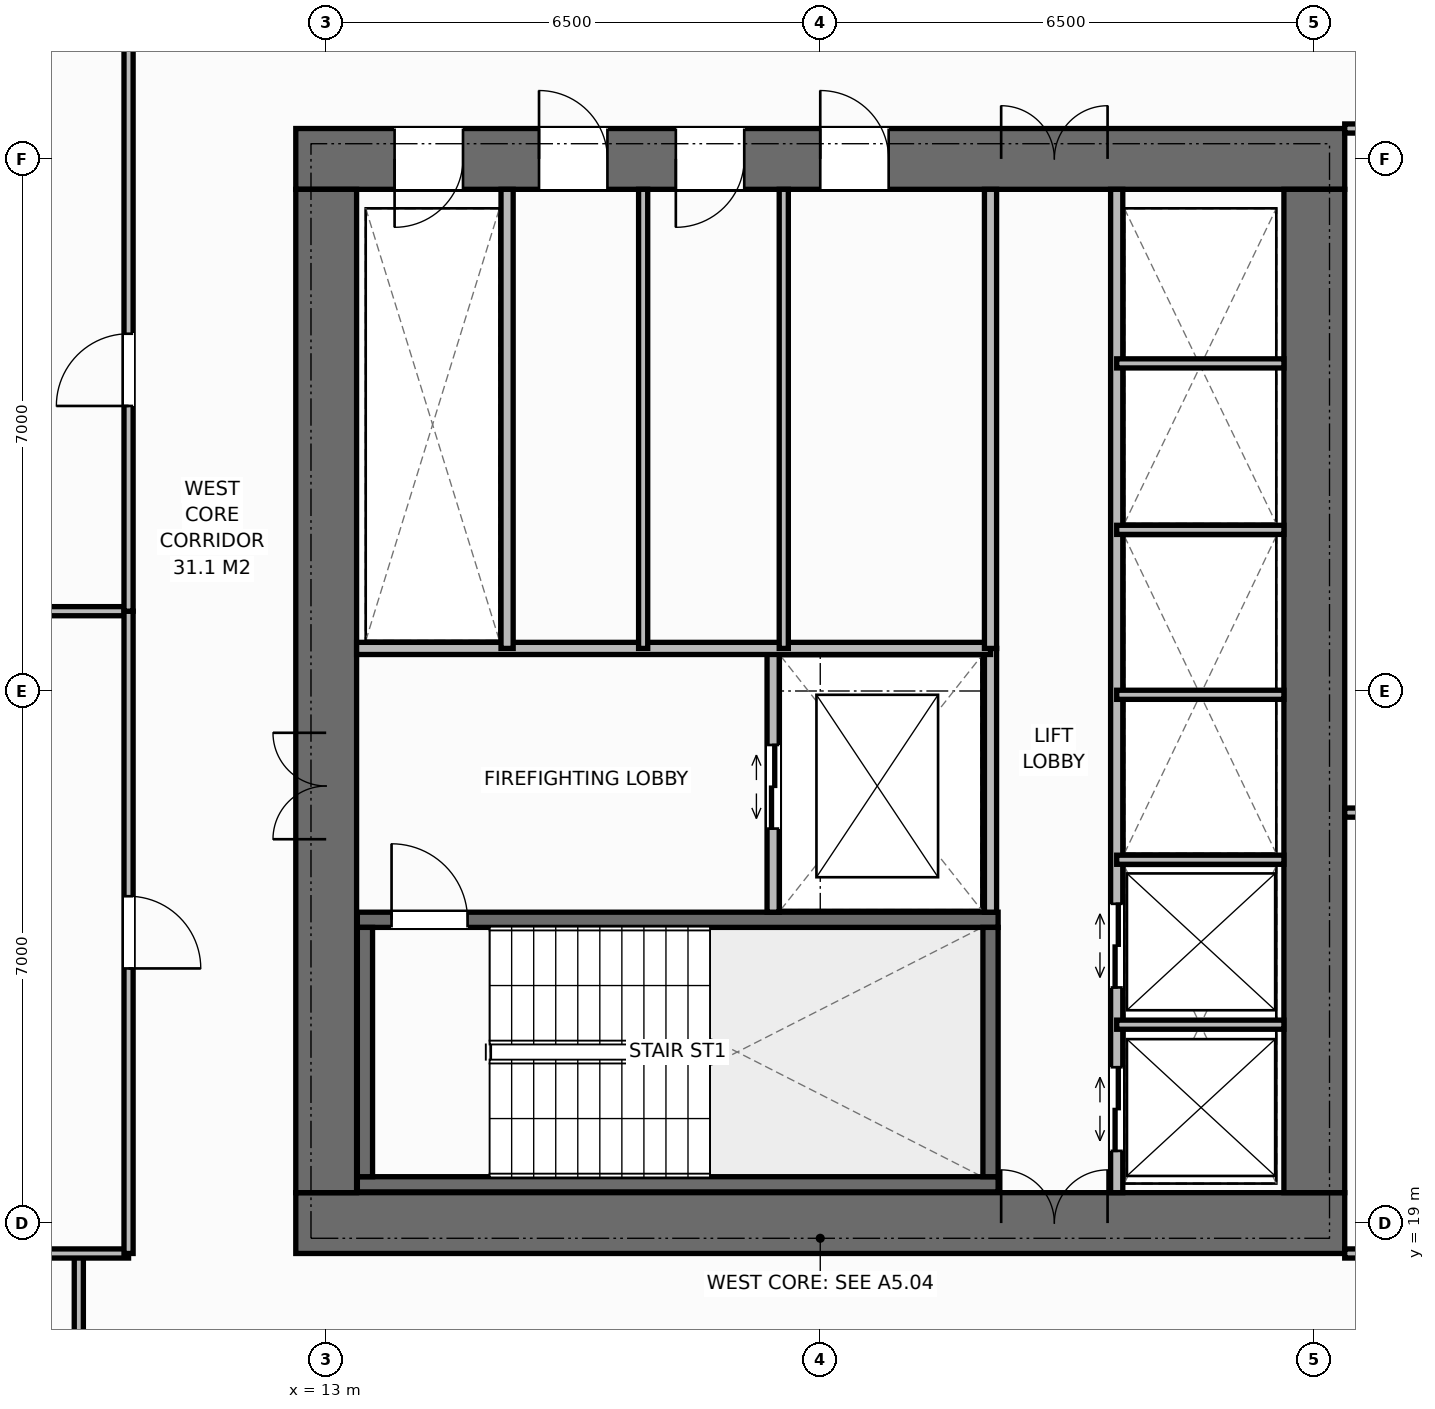
"""IFC4 building model, lengths in metres.
Left out: names, types, materials, properties, quantities, classifications, styles, units other than length and angle.
Written with IfcOpenShell. Run it as: python <this file> out.ifc"""

import sys

from ifc_helpers import new_model, si_unit, direction, frame, frame_2d, origin, place, context, subcontext, project, spatial, rectangle, extrude, element, fill, save


model = new_model("IFC4")
c1 = context("Model", 3, precision=1e-05, world=origin(), true_north=direction((0.0, 1.0)))
c2 = subcontext(c1, "Body", "Model", "MODEL_VIEW")
j1 = project(units=[si_unit("LENGTHUNIT", "METRE"), si_unit("PLANEANGLEUNIT", "RADIAN")], contexts=[c1])
p1 = place(None, origin())
s1 = spatial("IfcSite", under=j1, at=p1, CompositionType="ELEMENT")
p2 = place(p1, origin())
s2 = spatial("IfcBuilding", under=s1, at=p2, CompositionType="ELEMENT")
p3 = place(p2, frame((0.0, 0.0, 77.2)))
s3 = spatial("IfcBuildingStorey", under=s2, at=p3, CompositionType="ELEMENT", Elevation=77.2)
p4 = place(p3, frame((12.6, 19.0, 0.0), z_axis=(0.0, 0.0, 1.0), x_axis=(1.0, 0.0, 0.0)))
e1 = element("IfcWall", 1, at=p4, inside=s3, PredefinedType="SHEAR", context=c2, shape_type="SweptSolid", body=[
    extrude(rectangle(XDim=13.8, YDim=0.8, at=frame_2d((6.9, 0.0))), origin(), (0.0, 0.0, 1.0), 3.8),
])
p5 = place(p4, frame((9.28, 0.0, 0.0)))
e2 = element("IfcOpeningElement", 2, at=p5, cuts=e1, PredefinedType="OPENING", context=c2, shape_type="SweptSolid", body=[
    extrude(rectangle(XDim=1.4, YDim=2.2, at=frame_2d((0.7, 1.1))), frame((0.0, 0.41, 0.0), z_axis=(0.0, -1.0, 0.0), x_axis=(1.0, 0.0, 0.0)), (0.0, 0.0, 1.0), 0.82),
])
p6 = place(p3, frame((12.6, 33.0, 0.0), z_axis=(0.0, 0.0, 1.0), x_axis=(1.0, 0.0, 0.0)))
e3 = element("IfcWall", 3, at=p6, inside=s3, PredefinedType="SHEAR", context=c2, shape_type="SweptSolid", body=[
    extrude(rectangle(XDim=13.8, YDim=0.8, at=frame_2d((6.9, 0.0))), origin(), (0.0, 0.0, 1.0), 3.8),
])
p7 = place(p6, frame((1.3, 0.0, 0.0)))
e4 = element("IfcOpeningElement", 4, at=p7, cuts=e3, PredefinedType="OPENING", context=c2, shape_type="SweptSolid", body=[
    extrude(rectangle(XDim=0.9, YDim=2.15, at=frame_2d((0.45, 1.075))), frame((0.0, 0.41, 0.0), z_axis=(0.0, -1.0, 0.0), x_axis=(1.0, 0.0, 0.0)), (0.0, 0.0, 1.0), 0.82),
])
p8 = place(p6, frame((3.2, 0.0, 0.0)))
e5 = element("IfcOpeningElement", 5, at=p8, cuts=e3, PredefinedType="OPENING", context=c2, shape_type="SweptSolid", body=[
    extrude(rectangle(XDim=0.9, YDim=2.15, at=frame_2d((0.45, 1.075))), frame((0.0, 0.41, 0.0), z_axis=(0.0, -1.0, 0.0), x_axis=(1.0, 0.0, 0.0)), (0.0, 0.0, 1.0), 0.82),
])
p9 = place(p6, frame((5.0, 0.0, 0.0)))
e6 = element("IfcOpeningElement", 6, at=p9, cuts=e3, PredefinedType="OPENING", context=c2, shape_type="SweptSolid", body=[
    extrude(rectangle(XDim=0.9, YDim=2.15, at=frame_2d((0.45, 1.075))), frame((0.0, 0.41, 0.0), z_axis=(0.0, -1.0, 0.0), x_axis=(1.0, 0.0, 0.0)), (0.0, 0.0, 1.0), 0.82),
])
p10 = place(p6, frame((6.9, 0.0, 0.0)))
e7 = element("IfcOpeningElement", 7, at=p10, cuts=e3, PredefinedType="OPENING", context=c2, shape_type="SweptSolid", body=[
    extrude(rectangle(XDim=0.9, YDim=2.15, at=frame_2d((0.45, 1.075))), frame((0.0, 0.41, 0.0), z_axis=(0.0, -1.0, 0.0), x_axis=(1.0, 0.0, 0.0)), (0.0, 0.0, 1.0), 0.82),
])
p11 = place(p6, frame((9.28, 0.0, 0.0)))
e8 = element("IfcOpeningElement", 8, at=p11, cuts=e3, PredefinedType="OPENING", context=c2, shape_type="SweptSolid", body=[
    extrude(rectangle(XDim=1.4, YDim=2.2, at=frame_2d((0.7, 1.1))), frame((0.0, 0.41, 0.0), z_axis=(0.0, -1.0, 0.0), x_axis=(1.0, 0.0, 0.0)), (0.0, 0.0, 1.0), 0.82),
])
p12 = place(p3, frame((13.0, 19.4, 0.0), z_axis=(0.0, 0.0, 1.0), x_axis=(0.0, 1.0, 0.0)))
e9 = element("IfcWall", 9, at=p12, inside=s3, PredefinedType="SHEAR", context=c2, shape_type="SweptSolid", body=[
    extrude(rectangle(XDim=13.2, YDim=0.8, at=frame_2d((6.6, 0.0))), origin(), (0.0, 0.0, 1.0), 3.8),
])
p13 = place(p12, frame((4.65, 0.0, 0.0)))
e10 = element("IfcOpeningElement", 10, at=p13, cuts=e9, PredefinedType="OPENING", context=c2, shape_type="SweptSolid", body=[
    extrude(rectangle(XDim=1.4, YDim=2.2, at=frame_2d((0.7, 1.1))), frame((0.0, 0.41, 0.0), z_axis=(0.0, -1.0, 0.0), x_axis=(1.0, 0.0, 0.0)), (0.0, 0.0, 1.0), 0.82),
])
p14 = place(p3, frame((26.0, 19.4, 0.0), z_axis=(0.0, 0.0, 1.0), x_axis=(0.0, 1.0, 0.0)))
e11 = element("IfcWall", 11, at=p14, inside=s3, PredefinedType="SHEAR", context=c2, shape_type="SweptSolid", body=[
    extrude(rectangle(XDim=13.2, YDim=0.8, at=frame_2d((6.6, 0.0))), origin(), (0.0, 0.0, 1.0), 3.8),
])
p15 = place(p3, frame((13.41, 19.51, 0.0), z_axis=(0.0, 0.0, 1.0), x_axis=(1.0, 0.0, 0.0)))
e12 = element("IfcWall", 12, at=p15, inside=s3, PredefinedType="SHEAR", context=c2, shape_type="SweptSolid", body=[
    extrude(rectangle(XDim=8.43, YDim=0.2, at=frame_2d((4.215, 0.0))), origin(), (0.0, 0.0, 1.0), 3.8),
])
p16 = place(p3, frame((13.41, 22.99, 0.0), z_axis=(0.0, 0.0, 1.0), x_axis=(1.0, 0.0, 0.0)))
e13 = element("IfcWall", 13, at=p16, inside=s3, PredefinedType="SHEAR", context=c2, shape_type="SweptSolid", body=[
    extrude(rectangle(XDim=8.43, YDim=0.2, at=frame_2d((4.215, 0.0))), origin(), (0.0, 0.0, 1.0), 3.8),
])
p17 = place(p16, frame((0.45, 0.0, 0.0)))
e14 = element("IfcOpeningElement", 14, at=p17, cuts=e13, PredefinedType="OPENING", context=c2, shape_type="SweptSolid", body=[
    extrude(rectangle(XDim=1.0, YDim=2.15, at=frame_2d((0.5, 1.075))), frame((0.0, 0.11, 0.0), z_axis=(0.0, -1.0, 0.0), x_axis=(1.0, 0.0, 0.0)), (0.0, 0.0, 1.0), 0.22),
])
for number, where, z_axis, x_axis in (
    (15, (13.51, 19.61, 0.0), (0.0, 0.0, 1.0), (0.0, 1.0, 0.0)),
    (16, (21.74, 19.61, 0.0), (0.0, 0.0, 1.0), (0.0, 1.0, 0.0)),
):
    element("IfcWall", number, at=place(p3, frame(where, z_axis=z_axis, x_axis=x_axis)), inside=s3, PredefinedType="SHEAR", context=c2, shape_type="SweptSolid", body=[
        extrude(rectangle(XDim=3.28, YDim=0.2, at=frame_2d((1.64, 0.0))), origin(), (0.0, 0.0, 1.0), 3.8),
    ])
p18 = place(p3, frame((21.74, 23.09, 0.0), z_axis=(0.0, 0.0, 1.0), x_axis=(0.0, 1.0, 0.0)))
e17 = element("IfcWall", 17, at=p18, inside=s3, PredefinedType="STANDARD", context=c2, shape_type="SweptSolid", body=[
    extrude(rectangle(XDim=3.47, YDim=0.16, at=frame_2d((1.735, 0.0))), origin(), (0.0, 0.0, 1.0), 3.52),
])
p19 = place(p3, frame((18.88, 23.09, 0.0), z_axis=(0.0, 0.0, 1.0), x_axis=(0.0, 1.0, 0.0)))
e18 = element("IfcWall", 18, at=p19, inside=s3, PredefinedType="STANDARD", context=c2, shape_type="SweptSolid", body=[
    extrude(rectangle(XDim=3.47, YDim=0.16, at=frame_2d((1.735, 0.0))), origin(), (0.0, 0.0, 1.0), 3.52),
])
p20 = place(p19, frame((1.1, 0.0, 0.0)))
e19 = element("IfcOpeningElement", 19, at=p20, cuts=e18, PredefinedType="OPENING", context=c2, shape_type="SweptSolid", body=[
    extrude(rectangle(XDim=1.1, YDim=2.2, at=frame_2d((0.55, 1.1))), frame((0.0, 0.09, 0.0), z_axis=(0.0, -1.0, 0.0), x_axis=(1.0, 0.0, 0.0)), (0.0, 0.0, 1.0), 0.18),
])
p21 = place(p3, frame((13.4, 26.56, 0.0), z_axis=(0.0, 0.0, 1.0), x_axis=(1.0, 0.0, 0.0)))
e20 = element("IfcWall", 20, at=p21, inside=s3, PredefinedType="STANDARD", context=c2, shape_type="SweptSolid", body=[
    extrude(rectangle(XDim=8.34, YDim=0.16, at=frame_2d((4.17, 0.0))), origin(), (0.0, 0.0, 1.0), 3.52),
])
p22 = place(p3, frame((15.38, 26.56, 0.0), z_axis=(0.0, 0.0, 1.0), x_axis=(0.0, 1.0, 0.0)))
e21 = element("IfcWall", 21, at=p22, inside=s3, PredefinedType="STANDARD", context=c2, shape_type="SweptSolid", body=[
    extrude(rectangle(XDim=6.04, YDim=0.16, at=frame_2d((3.02, 0.0))), origin(), (0.0, 0.0, 1.0), 3.52),
])
for number, where, z_axis, x_axis in (
    (22, (17.17, 26.56, 0.0), (0.0, 0.0, 1.0), (0.0, 1.0, 0.0)),
    (23, (19.02, 26.56, 0.0), (0.0, 0.0, 1.0), (0.0, 1.0, 0.0)),
):
    element("IfcWall", number, at=place(p3, frame(where, z_axis=z_axis, x_axis=x_axis)), inside=s3, PredefinedType="PARTITIONING", context=c2, shape_type="SweptSolid", body=[
        extrude(rectangle(XDim=6.04, YDim=0.12, at=frame_2d((3.02, 0.0))), origin(), (0.0, 0.0, 1.0), 3.52),
    ])
p23 = place(p3, frame((21.74, 26.56, 0.0), z_axis=(0.0, 0.0, 1.0), x_axis=(0.0, 1.0, 0.0)))
e24 = element("IfcWall", 24, at=p23, inside=s3, PredefinedType="STANDARD", context=c2, shape_type="SweptSolid", body=[
    extrude(rectangle(XDim=6.04, YDim=0.16, at=frame_2d((3.02, 0.0))), origin(), (0.0, 0.0, 1.0), 3.52),
])
p24 = place(p3, frame((23.4, 19.4, 0.0), z_axis=(0.0, 0.0, 1.0), x_axis=(0.0, 1.0, 0.0)))
e25 = element("IfcWall", 25, at=p24, inside=s3, PredefinedType="STANDARD", context=c2, shape_type="SweptSolid", body=[
    extrude(rectangle(XDim=13.2, YDim=0.16, at=frame_2d((6.6, 0.0))), origin(), (0.0, 0.0, 1.0), 3.52),
])
p25 = place(p24, frame((0.55, 0.0, 0.0)))
e26 = element("IfcOpeningElement", 26, at=p25, cuts=e25, PredefinedType="OPENING", context=c2, shape_type="SweptSolid", body=[
    extrude(rectangle(XDim=1.1, YDim=2.2, at=frame_2d((0.55, 1.1))), frame((0.0, 0.09, 0.0), z_axis=(0.0, -1.0, 0.0), x_axis=(1.0, 0.0, 0.0)), (0.0, 0.0, 1.0), 0.18),
])
p26 = place(p24, frame((2.7, 0.0, 0.0)))
e27 = element("IfcOpeningElement", 27, at=p26, cuts=e25, PredefinedType="OPENING", context=c2, shape_type="SweptSolid", body=[
    extrude(rectangle(XDim=1.1, YDim=2.2, at=frame_2d((0.55, 1.1))), frame((0.0, 0.09, 0.0), z_axis=(0.0, -1.0, 0.0), x_axis=(1.0, 0.0, 0.0)), (0.0, 0.0, 1.0), 0.18),
])
for number, where, z_axis, x_axis in (
    (28, (23.4, 21.61, 0.0), (0.0, 0.0, 1.0), (1.0, 0.0, 0.0)),
    (29, (23.4, 23.78, 0.0), (0.0, 0.0, 1.0), (1.0, 0.0, 0.0)),
    (30, (23.4, 25.95, 0.0), (0.0, 0.0, 1.0), (1.0, 0.0, 0.0)),
    (31, (23.4, 28.12, 0.0), (0.0, 0.0, 1.0), (1.0, 0.0, 0.0)),
    (32, (23.4, 30.31, 0.0), (0.0, 0.0, 1.0), (1.0, 0.0, 0.0)),
):
    element("IfcWall", number, at=place(p3, frame(where, z_axis=z_axis, x_axis=x_axis)), inside=s3, PredefinedType="PARTITIONING", context=c2, shape_type="SweptSolid", body=[
        extrude(rectangle(XDim=2.2, YDim=0.12, at=frame_2d((1.1, 0.0))), origin(), (0.0, 0.0, 1.0), 3.52),
    ])
p27 = place(p3, frame((26.4, 24.4, 0.0), z_axis=(0.0, 0.0, 1.0), x_axis=(1.0, 0.0, 0.0)))
e33 = element("IfcWall", 33, at=p27, inside=s3, PredefinedType="PARTITIONING", context=c2, shape_type="SweptSolid", body=[
    extrude(rectangle(XDim=3.6, YDim=0.12, at=frame_2d((1.8, 0.0))), origin(), (0.0, 0.0, 1.0), 3.52),
])
p28 = place(p3, frame((26.4, 18.6, 0.0), z_axis=(0.0, 0.0, 1.0), x_axis=(1.0, 0.0, 0.0)))
e34 = element("IfcWall", 34, at=p28, inside=s3, PredefinedType="PARTITIONING", context=c2, shape_type="SweptSolid", body=[
    extrude(rectangle(XDim=3.6, YDim=0.12, at=frame_2d((1.8, 0.0))), origin(), (0.0, 0.0, 1.0), 3.52),
])
p29 = place(p28, frame((1.1, 0.0, 0.0)))
e35 = element("IfcOpeningElement", 35, at=p29, cuts=e34, PredefinedType="OPENING", context=c2, shape_type="SweptSolid", body=[
    extrude(rectangle(XDim=0.95, YDim=2.15, at=frame_2d((0.475, 1.075))), frame((0.0, 0.07, 0.0), z_axis=(0.0, -1.0, 0.0), x_axis=(1.0, 0.0, 0.0)), (0.0, 0.0, 1.0), 0.14),
])
p30 = place(p3, frame((26.4, 33.4, 0.0), z_axis=(0.0, 0.0, 1.0), x_axis=(1.0, 0.0, 0.0)))
e36 = element("IfcWall", 36, at=p30, inside=s3, PredefinedType="PARTITIONING", context=c2, shape_type="SweptSolid", body=[
    extrude(rectangle(XDim=3.6, YDim=0.12, at=frame_2d((1.8, 0.0))), origin(), (0.0, 0.0, 1.0), 3.52),
])
p31 = place(p30, frame((1.1, 0.0, 0.0)))
e37 = element("IfcOpeningElement", 37, at=p31, cuts=e36, PredefinedType="OPENING", context=c2, shape_type="SweptSolid", body=[
    extrude(rectangle(XDim=0.95, YDim=2.15, at=frame_2d((0.475, 1.075))), frame((0.0, 0.07, 0.0), z_axis=(0.0, -1.0, 0.0), x_axis=(1.0, 0.0, 0.0)), (0.0, 0.0, 1.0), 0.14),
])
p32 = place(p3, frame((9.746, 16.5, 0.0), z_axis=(0.0, 0.0, 1.0), x_axis=(0.0, 1.0, 0.0)))
e38 = element("IfcWall", 38, at=p32, inside=s3, PredefinedType="PARTITIONING", context=c2, shape_type="SweptSolid", body=[
    extrude(rectangle(XDim=2.1, YDim=0.12, at=frame_2d((1.05, 0.0))), origin(), (0.0, 0.0, 1.0), 3.52),
])
for number, where, z_axis, x_axis in (
    (39, (-0.18, 18.6, 0.0), (0.0, 0.0, 1.0), (1.0, 0.0, 0.0)),
    (40, (-0.18, 27.05, 0.0), (0.0, 0.0, 1.0), (1.0, 0.0, 0.0)),
):
    element("IfcWall", number, at=place(p3, frame(where, z_axis=z_axis, x_axis=x_axis)), inside=s3, PredefinedType="PARTITIONING", context=c2, shape_type="SweptSolid", body=[
        extrude(rectangle(XDim=10.58, YDim=0.12, at=frame_2d((5.29, 0.0))), origin(), (0.0, 0.0, 1.0), 3.52),
    ])
p33 = place(p3, frame((10.4, 18.6, 0.0), z_axis=(0.0, 0.0, 1.0), x_axis=(0.0, 1.0, 0.0)))
e41 = element("IfcWall", 41, at=p33, inside=s3, PredefinedType="PARTITIONING", context=c2, shape_type="SweptSolid", body=[
    extrude(rectangle(XDim=8.45, YDim=0.12, at=frame_2d((4.225, 0.0))), origin(), (0.0, 0.0, 1.0), 3.52),
])
p34 = place(p33, frame((3.75, 0.0, 0.0)))
e42 = element("IfcOpeningElement", 42, at=p34, cuts=e41, PredefinedType="OPENING", context=c2, shape_type="SweptSolid", body=[
    extrude(rectangle(XDim=0.95, YDim=2.15, at=frame_2d((0.475, 1.075))), frame((0.0, 0.07, 0.0), z_axis=(0.0, -1.0, 0.0), x_axis=(1.0, 0.0, 0.0)), (0.0, 0.0, 1.0), 0.14),
])
p35 = place(p3, frame((10.4, 27.05, 0.0), z_axis=(0.0, 0.0, 1.0), x_axis=(0.0, 1.0, 0.0)))
e43 = element("IfcWall", 43, at=p35, inside=s3, PredefinedType="PARTITIONING", context=c2, shape_type="SweptSolid", body=[
    extrude(rectangle(XDim=8.45, YDim=0.12, at=frame_2d((4.225, 0.0))), origin(), (0.0, 0.0, 1.0), 3.52),
])
p36 = place(p35, frame((2.7, 0.0, 0.0)))
e44 = element("IfcOpeningElement", 44, at=p36, cuts=e43, PredefinedType="OPENING", context=c2, shape_type="SweptSolid", body=[
    extrude(rectangle(XDim=0.95, YDim=2.15, at=frame_2d((0.475, 1.075))), frame((0.0, 0.07, 0.0), z_axis=(0.0, -1.0, 0.0), x_axis=(1.0, 0.0, 0.0)), (0.0, 0.0, 1.0), 0.14),
])
p37 = place(p17, origin())
e45 = element("IfcDoor", 45, at=p37, inside=s3, OperationType="SINGLE_SWING_LEFT", PredefinedType="DOOR", context=c2, shape_type="SweptSolid", body=[
    extrude(rectangle(XDim=1.0, YDim=2.15, at=frame_2d((0.5, 1.075))), frame((0.0, 0.025, 0.0), z_axis=(0.0, -1.0, 0.0), x_axis=(1.0, 0.0, 0.0)), (0.0, 0.0, 1.0), 0.05),
])
fill(e14, e45)
p38 = place(p13, origin())
e46 = element("IfcDoor", 46, at=p38, inside=s3, OperationType="DOUBLE_DOOR_SINGLE_SWING", PredefinedType="DOOR", context=c2, shape_type="SweptSolid", body=[
    extrude(rectangle(XDim=1.4, YDim=2.2, at=frame_2d((0.7, 1.1))), frame((0.0, 0.025, 0.0), z_axis=(0.0, -1.0, 0.0), x_axis=(1.0, 0.0, 0.0)), (0.0, 0.0, 1.0), 0.05),
])
fill(e10, e46)
p39 = place(p20, origin())
e47 = element("IfcDoor", 47, at=p39, inside=s3, OperationType="DOUBLE_DOOR_SLIDING", PredefinedType="DOOR", context=c2, shape_type="SweptSolid", body=[
    extrude(rectangle(XDim=1.1, YDim=2.2, at=frame_2d((0.55, 1.1))), frame((0.0, 0.025, 0.0), z_axis=(0.0, -1.0, 0.0), x_axis=(1.0, 0.0, 0.0)), (0.0, 0.0, 1.0), 0.05),
])
fill(e19, e47)
p40 = place(p7, origin())
e48 = element("IfcDoor", 48, at=p40, inside=s3, OperationType="SINGLE_SWING_RIGHT", PredefinedType="DOOR", context=c2, shape_type="SweptSolid", body=[
    extrude(rectangle(XDim=0.9, YDim=2.15, at=frame_2d((0.45, 1.075))), frame((0.0, -0.075, 0.0), z_axis=(0.0, -1.0, 0.0), x_axis=(1.0, 0.0, 0.0)), (0.0, 0.0, 1.0), 0.05),
])
fill(e4, e48)
p41 = place(p8, origin())
e49 = element("IfcDoor", 49, at=p41, inside=s3, OperationType="SINGLE_SWING_LEFT", PredefinedType="DOOR", context=c2, shape_type="SweptSolid", body=[
    extrude(rectangle(XDim=0.9, YDim=2.15, at=frame_2d((0.45, 1.075))), frame((0.0, -0.075, 0.0), z_axis=(0.0, -1.0, 0.0), x_axis=(1.0, 0.0, 0.0)), (0.0, 0.0, 1.0), 0.05),
])
fill(e5, e49)
p42 = place(p9, origin())
e50 = element("IfcDoor", 50, at=p42, inside=s3, OperationType="SINGLE_SWING_RIGHT", PredefinedType="DOOR", context=c2, shape_type="SweptSolid", body=[
    extrude(rectangle(XDim=0.9, YDim=2.15, at=frame_2d((0.45, 1.075))), frame((0.0, -0.075, 0.0), z_axis=(0.0, -1.0, 0.0), x_axis=(1.0, 0.0, 0.0)), (0.0, 0.0, 1.0), 0.05),
])
fill(e6, e50)
p43 = place(p10, origin())
e51 = element("IfcDoor", 51, at=p43, inside=s3, OperationType="SINGLE_SWING_LEFT", PredefinedType="DOOR", context=c2, shape_type="SweptSolid", body=[
    extrude(rectangle(XDim=0.9, YDim=2.15, at=frame_2d((0.45, 1.075))), frame((0.0, -0.075, 0.0), z_axis=(0.0, -1.0, 0.0), x_axis=(1.0, 0.0, 0.0)), (0.0, 0.0, 1.0), 0.05),
])
fill(e7, e51)
p44 = place(p5, origin())
e52 = element("IfcDoor", 52, at=p44, inside=s3, OperationType="DOUBLE_DOOR_SINGLE_SWING", PredefinedType="DOOR", context=c2, shape_type="SweptSolid", body=[
    extrude(rectangle(XDim=1.4, YDim=2.2, at=frame_2d((0.7, 1.1))), frame((0.0, 0.125, 0.0), z_axis=(0.0, -1.0, 0.0), x_axis=(1.0, 0.0, 0.0)), (0.0, 0.0, 1.0), 0.05),
])
fill(e2, e52)
p45 = place(p11, origin())
e53 = element("IfcDoor", 53, at=p45, inside=s3, OperationType="DOUBLE_DOOR_SINGLE_SWING", PredefinedType="DOOR", context=c2, shape_type="SweptSolid", body=[
    extrude(rectangle(XDim=1.4, YDim=2.2, at=frame_2d((0.7, 1.1))), frame((0.0, -0.075, 0.0), z_axis=(0.0, -1.0, 0.0), x_axis=(1.0, 0.0, 0.0)), (0.0, 0.0, 1.0), 0.05),
])
fill(e8, e53)
p46 = place(p25, origin())
e54 = element("IfcDoor", 54, at=p46, inside=s3, OperationType="DOUBLE_DOOR_SLIDING", PredefinedType="DOOR", context=c2, shape_type="SweptSolid", body=[
    extrude(rectangle(XDim=1.1, YDim=2.2, at=frame_2d((0.55, 1.1))), frame((0.0, 0.025, 0.0), z_axis=(0.0, -1.0, 0.0), x_axis=(1.0, 0.0, 0.0)), (0.0, 0.0, 1.0), 0.05),
])
fill(e26, e54)
p47 = place(p26, origin())
e55 = element("IfcDoor", 55, at=p47, inside=s3, OperationType="DOUBLE_DOOR_SLIDING", PredefinedType="DOOR", context=c2, shape_type="SweptSolid", body=[
    extrude(rectangle(XDim=1.1, YDim=2.2, at=frame_2d((0.55, 1.1))), frame((0.0, 0.025, 0.0), z_axis=(0.0, -1.0, 0.0), x_axis=(1.0, 0.0, 0.0)), (0.0, 0.0, 1.0), 0.05),
])
fill(e27, e55)
p48 = place(p34, origin())
e56 = element("IfcDoor", 56, at=p48, inside=s3, OperationType="SINGLE_SWING_RIGHT", PredefinedType="DOOR", context=c2, shape_type="SweptSolid", body=[
    extrude(rectangle(XDim=0.95, YDim=2.15, at=frame_2d((0.475, 1.075))), frame((0.0, 0.025, 0.0), z_axis=(0.0, -1.0, 0.0), x_axis=(1.0, 0.0, 0.0)), (0.0, 0.0, 1.0), 0.05),
])
fill(e42, e56)
p49 = place(p36, origin())
e57 = element("IfcDoor", 57, at=p49, inside=s3, OperationType="SINGLE_SWING_LEFT", PredefinedType="DOOR", context=c2, shape_type="SweptSolid", body=[
    extrude(rectangle(XDim=0.95, YDim=2.15, at=frame_2d((0.475, 1.075))), frame((0.0, 0.025, 0.0), z_axis=(0.0, -1.0, 0.0), x_axis=(1.0, 0.0, 0.0)), (0.0, 0.0, 1.0), 0.05),
])
fill(e44, e57)
save(model, sys.argv[1])
